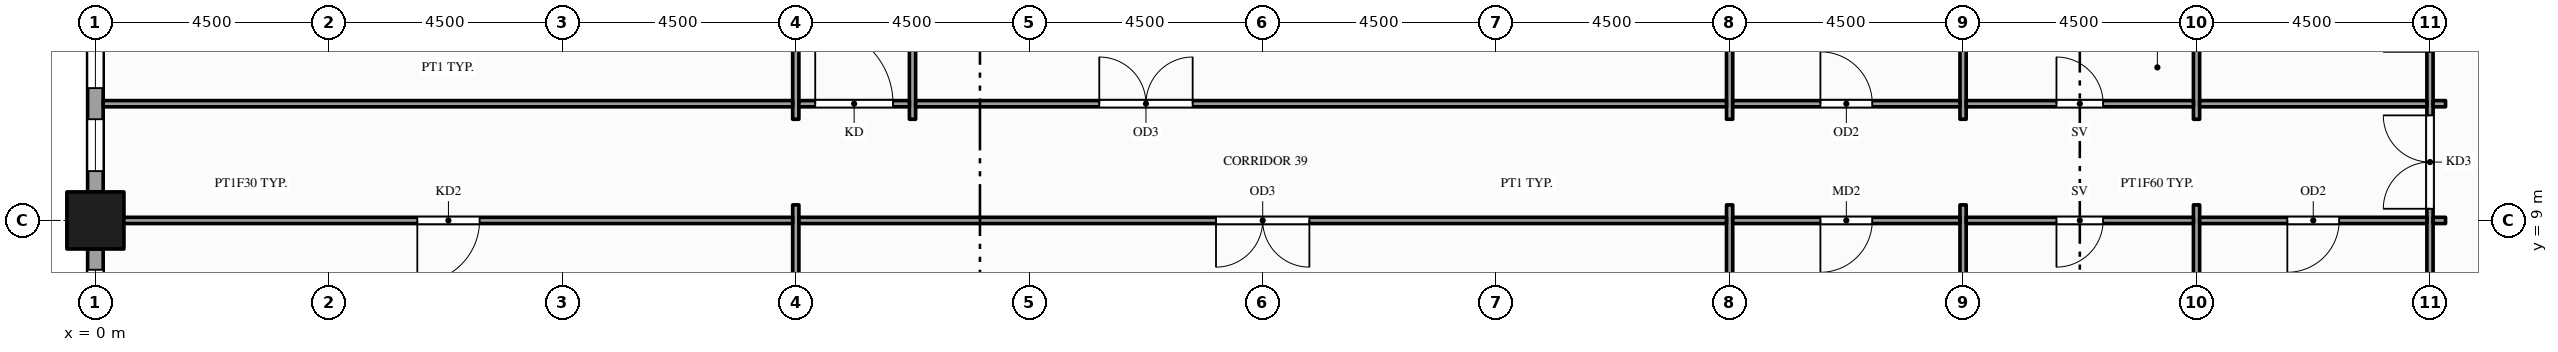
"""IFC4 building model, lengths in metres.
Left out: names, types, materials, properties, quantities, classifications, styles, units other than length and angle.
Written with IfcOpenShell. Run it as: python <this file> out.ifc"""

import sys

from ifc_helpers import new_model, si_unit, direction, frame, frame_2d, origin, origin_2d, place, context, subcontext, project, spatial, rectangle, hollow_rectangle, extrude, element, fill, save


model = new_model("IFC4")
c1 = context("Model", 3, precision=1e-05, world=origin(), true_north=direction((0.0, 1.0)))
c2 = subcontext(c1, "Body", "Model", "MODEL_VIEW")
j1 = project(units=[si_unit("LENGTHUNIT", "METRE"), si_unit("PLANEANGLEUNIT", "RADIAN")], contexts=[c1])
p1 = place(None, origin())
s1 = spatial("IfcSite", under=j1, at=p1, CompositionType="ELEMENT")
p2 = place(p1, origin())
s2 = spatial("IfcBuilding", under=s1, at=p2, CompositionType="ELEMENT")
p3 = place(p2, frame((0.0, 0.0, 61.0)))
s3 = spatial("IfcBuildingStorey", under=s2, at=p3, CompositionType="ELEMENT", Elevation=61.0)
p4 = place(p3, frame((0.0, 9.0, -0.15), z_axis=(0.0, 0.0, 1.0), x_axis=(1.0, 0.0, 0.0)))
e1 = element("IfcColumn", 1, at=p4, inside=s3, PredefinedType="COLUMN", context=c2, shape_type="SweptSolid", body=[
    extrude(hollow_rectangle(XDim=1.1, YDim=1.1, WallThickness=0.06, at=origin_2d()), origin(), (0.0, 0.0, 1.0), 4.0),
])
p5 = place(p3, frame((0.0, 12.95, 0.0), z_axis=(0.0, 0.0, 1.0), x_axis=(0.0, -1.0, 0.0)))
e2 = element("IfcWall", 2, at=p5, inside=s3, PredefinedType="STANDARD", context=c2, shape_type="SweptSolid", body=[
    extrude(rectangle(XDim=3.4, YDim=0.3, at=frame_2d((1.7, 0.0))), origin(), (0.0, 0.0, 1.0), 3.144),
])
p6 = place(p5, frame((0.4, 0.0, 0.9)))
e3 = element("IfcOpeningElement", 3, at=p6, cuts=e2, PredefinedType="OPENING", context=c2, shape_type="SweptSolid", body=[
    extrude(rectangle(XDim=1.0, YDim=2.0, at=frame_2d((0.5, 1.0))), frame((0.0, 0.16, 0.0), z_axis=(0.0, -1.0, 0.0), x_axis=(1.0, 0.0, 0.0)), (0.0, 0.0, 1.0), 0.32),
])
p7 = place(p5, frame((2.0, 0.0, 0.9)))
e4 = element("IfcOpeningElement", 4, at=p7, cuts=e2, PredefinedType="OPENING", context=c2, shape_type="SweptSolid", body=[
    extrude(rectangle(XDim=1.0, YDim=2.0, at=frame_2d((0.5, 1.0))), frame((0.0, 0.16, 0.0), z_axis=(0.0, -1.0, 0.0), x_axis=(1.0, 0.0, 0.0)), (0.0, 0.0, 1.0), 0.32),
])
p8 = place(p3, frame((0.0, 8.45, 0.0), z_axis=(0.0, 0.0, 1.0), x_axis=(0.0, -1.0, 0.0)))
e5 = element("IfcWall", 5, at=p8, inside=s3, PredefinedType="STANDARD", context=c2, shape_type="SweptSolid", body=[
    extrude(rectangle(XDim=3.4, YDim=0.3, at=frame_2d((1.7, 0.0))), origin(), (0.0, 0.0, 1.0), 3.144),
])
p9 = place(p8, frame((0.4, 0.0, 0.9)))
e6 = element("IfcOpeningElement", 6, at=p9, cuts=e5, PredefinedType="OPENING", context=c2, shape_type="SweptSolid", body=[
    extrude(rectangle(XDim=1.0, YDim=2.0, at=frame_2d((0.5, 1.0))), frame((0.0, 0.16, 0.0), z_axis=(0.0, -1.0, 0.0), x_axis=(1.0, 0.0, 0.0)), (0.0, 0.0, 1.0), 0.32),
])
p10 = place(p8, frame((2.0, 0.0, 0.9)))
e7 = element("IfcOpeningElement", 7, at=p10, cuts=e5, PredefinedType="OPENING", context=c2, shape_type="SweptSolid", body=[
    extrude(rectangle(XDim=1.0, YDim=2.0, at=frame_2d((0.5, 1.0))), frame((0.0, 0.16, 0.0), z_axis=(0.0, -1.0, 0.0), x_axis=(1.0, 0.0, 0.0)), (0.0, 0.0, 1.0), 0.32),
])
p11 = place(p3, frame((13.5, 0.15, 0.0), z_axis=(0.0, 0.0, 1.0), x_axis=(0.0, 1.0, 0.0)))
e8 = element("IfcWall", 8, at=p11, inside=s3, PredefinedType="PARTITIONING", context=c2, shape_type="SweptSolid", body=[
    extrude(rectangle(XDim=9.15, YDim=0.12, at=frame_2d((4.575, 0.0))), origin(), (0.0, 0.0, 1.0), 2.938),
])
p12 = place(p3, frame((13.5, 10.95, 0.0), z_axis=(0.0, 0.0, 1.0), x_axis=(0.0, 1.0, 0.0)))
e9 = element("IfcWall", 9, at=p12, inside=s3, PredefinedType="PARTITIONING", context=c2, shape_type="SweptSolid", body=[
    extrude(rectangle(XDim=20.85, YDim=0.12, at=frame_2d((10.425, 0.0))), origin(), (0.0, 0.0, 1.0), 2.6),
])
p13 = place(p12, frame((2.05, 0.0, 0.0)))
e10 = element("IfcOpeningElement", 10, at=p13, cuts=e9, PredefinedType="OPENING", context=c2, shape_type="SweptSolid", body=[
    extrude(rectangle(XDim=1.0, YDim=2.1, at=frame_2d((0.5, 1.05))), frame((0.0, 0.07, 0.0), z_axis=(0.0, -1.0, 0.0), x_axis=(1.0, 0.0, 0.0)), (0.0, 0.0, 1.0), 0.14),
])
p14 = place(p12, frame((6.55, 0.0, 0.0)))
e11 = element("IfcOpeningElement", 11, at=p14, cuts=e9, PredefinedType="OPENING", context=c2, shape_type="SweptSolid", body=[
    extrude(rectangle(XDim=1.0, YDim=2.1, at=frame_2d((0.5, 1.05))), frame((0.0, 0.07, 0.0), z_axis=(0.0, -1.0, 0.0), x_axis=(1.0, 0.0, 0.0)), (0.0, 0.0, 1.0), 0.14),
])
p15 = place(p12, frame((11.805, 0.0, 0.0)))
e12 = element("IfcOpeningElement", 12, at=p15, cuts=e9, PredefinedType="OPENING", context=c2, shape_type="SweptSolid", body=[
    extrude(rectangle(XDim=1.8, YDim=2.1, at=frame_2d((0.9, 1.05))), frame((0.0, 0.07, 0.0), z_axis=(0.0, -1.0, 0.0), x_axis=(1.0, 0.0, 0.0)), (0.0, 0.0, 1.0), 0.14),
])
p16 = place(p3, frame((15.75, 10.95, 0.0), z_axis=(0.0, 0.0, 1.0), x_axis=(0.0, 1.0, 0.0)))
e13 = element("IfcWall", 13, at=p16, inside=s3, PredefinedType="PARTITIONING", context=c2, shape_type="SweptSolid", body=[
    extrude(rectangle(XDim=20.85, YDim=0.12, at=frame_2d((10.425, 0.0))), origin(), (0.0, 0.0, 1.0), 2.6),
])
p17 = place(p16, frame((17.8, 0.0, 0.0)))
e14 = element("IfcOpeningElement", 14, at=p17, cuts=e13, PredefinedType="OPENING", context=c2, shape_type="SweptSolid", body=[
    extrude(rectangle(XDim=1.0, YDim=2.1, at=frame_2d((0.5, 1.05))), frame((0.0, 0.07, 0.0), z_axis=(0.0, -1.0, 0.0), x_axis=(1.0, 0.0, 0.0)), (0.0, 0.0, 1.0), 0.14),
])
p18 = place(p16, frame((4.2, 0.0, 0.0)))
e15 = element("IfcOpeningElement", 15, at=p18, cuts=e13, PredefinedType="OPENING", context=c2, shape_type="SweptSolid", body=[
    extrude(rectangle(XDim=1.2, YDim=2.1, at=frame_2d((0.6, 1.05))), frame((0.0, 0.07, 0.0), z_axis=(0.0, -1.0, 0.0), x_axis=(1.0, 0.0, 0.0)), (0.0, 0.0, 1.0), 0.14),
])
p19 = place(p3, frame((31.5, 1.65, 0.0), z_axis=(0.0, 0.0, 1.0), x_axis=(0.0, 1.0, 0.0)))
e16 = element("IfcWall", 16, at=p19, inside=s3, PredefinedType="PARTITIONING", context=c2, shape_type="SweptSolid", body=[
    extrude(rectangle(XDim=7.65, YDim=0.12, at=frame_2d((3.825, 0.0))), origin(), (0.0, 0.0, 1.0), 2.938),
])
p20 = place(p3, frame((31.5, 10.95, 0.0), z_axis=(0.0, 0.0, 1.0), x_axis=(0.0, 1.0, 0.0)))
e17 = element("IfcWall", 17, at=p20, inside=s3, PredefinedType="PARTITIONING", context=c2, shape_type="SweptSolid", body=[
    extrude(rectangle(XDim=12.9, YDim=0.12, at=frame_2d((6.45, 0.0))), origin(), (0.0, 0.0, 1.0), 2.938),
])
p21 = place(p3, frame((36.0, 1.65, 0.0), z_axis=(0.0, 0.0, 1.0), x_axis=(0.0, 1.0, 0.0)))
e18 = element("IfcWall", 18, at=p21, inside=s3, PredefinedType="PARTITIONING", context=c2, shape_type="SweptSolid", body=[
    extrude(rectangle(XDim=7.65, YDim=0.12, at=frame_2d((3.825, 0.0))), origin(), (0.0, 0.0, 1.0), 2.938),
])
p22 = place(p3, frame((36.0, 10.95, 0.0), z_axis=(0.0, 0.0, 1.0), x_axis=(0.0, 1.0, 0.0)))
e19 = element("IfcWall", 19, at=p22, inside=s3, PredefinedType="PARTITIONING", context=c2, shape_type="SweptSolid", body=[
    extrude(rectangle(XDim=12.9, YDim=0.12, at=frame_2d((6.45, 0.0))), origin(), (0.0, 0.0, 1.0), 2.938),
])
p23 = place(p3, frame((40.5, 1.65, 0.0), z_axis=(0.0, 0.0, 1.0), x_axis=(0.0, 1.0, 0.0)))
e20 = element("IfcWall", 20, at=p23, inside=s3, PredefinedType="PARTITIONING", context=c2, shape_type="SweptSolid", body=[
    extrude(rectangle(XDim=7.65, YDim=0.12, at=frame_2d((3.825, 0.0))), origin(), (0.0, 0.0, 1.0), 2.938),
])
p24 = place(p3, frame((40.5, 10.95, 0.0), z_axis=(0.0, 0.0, 1.0), x_axis=(0.0, 1.0, 0.0)))
e21 = element("IfcWall", 21, at=p24, inside=s3, PredefinedType="PARTITIONING", context=c2, shape_type="SweptSolid", body=[
    extrude(rectangle(XDim=12.9, YDim=0.12, at=frame_2d((6.45, 0.0))), origin(), (0.0, 0.0, 1.0), 2.938),
])
p25 = place(p3, frame((45.0, 1.65, 0.0), z_axis=(0.0, 0.0, 1.0), x_axis=(0.0, 1.0, 0.0)))
e22 = element("IfcWall", 22, at=p25, inside=s3, PredefinedType="PARTITIONING", context=c2, shape_type="SweptSolid", body=[
    extrude(rectangle(XDim=22.2, YDim=0.12, at=frame_2d((11.1, 0.0))), origin(), (0.0, 0.0, 1.0), 2.938),
])
p26 = place(p25, frame((7.575, 0.0, 0.0)))
e23 = element("IfcOpeningElement", 23, at=p26, cuts=e22, PredefinedType="OPENING", context=c2, shape_type="SweptSolid", body=[
    extrude(rectangle(XDim=1.8, YDim=2.1, at=frame_2d((0.9, 1.05))), frame((0.0, 0.07, 0.0), z_axis=(0.0, -1.0, 0.0), x_axis=(1.0, 0.0, 0.0)), (0.0, 0.0, 1.0), 0.14),
])
p27 = place(p25, frame((10.6, 0.0, 0.0)))
e24 = element("IfcOpeningElement", 24, at=p27, cuts=e22, PredefinedType="OPENING", context=c2, shape_type="SweptSolid", body=[
    extrude(rectangle(XDim=0.9, YDim=2.1, at=frame_2d((0.45, 1.05))), frame((0.0, 0.07, 0.0), z_axis=(0.0, -1.0, 0.0), x_axis=(1.0, 0.0, 0.0)), (0.0, 0.0, 1.0), 0.14),
])
p28 = place(p25, frame((15.525, 0.0, 0.0)))
e25 = element("IfcOpeningElement", 25, at=p28, cuts=e22, PredefinedType="OPENING", context=c2, shape_type="SweptSolid", body=[
    extrude(rectangle(XDim=0.9, YDim=2.1, at=frame_2d((0.45, 1.05))), frame((0.0, 0.07, 0.0), z_axis=(0.0, -1.0, 0.0), x_axis=(1.0, 0.0, 0.0)), (0.0, 0.0, 1.0), 0.14),
])
p29 = place(p25, frame((20.35, 0.0, 0.0)))
e26 = element("IfcOpeningElement", 26, at=p29, cuts=e22, PredefinedType="OPENING", context=c2, shape_type="SweptSolid", body=[
    extrude(rectangle(XDim=1.0, YDim=2.1, at=frame_2d((0.5, 1.05))), frame((0.0, 0.07, 0.0), z_axis=(0.0, -1.0, 0.0), x_axis=(1.0, 0.0, 0.0)), (0.0, 0.0, 1.0), 0.14),
])
p30 = place(p3, frame((0.15, 9.0, 0.0), z_axis=(0.0, 0.0, 1.0), x_axis=(1.0, 0.0, 0.0)))
e27 = element("IfcWall", 27, at=p30, inside=s3, PredefinedType="PARTITIONING", context=c2, shape_type="SweptSolid", body=[
    extrude(rectangle(XDim=13.29, YDim=0.12, at=frame_2d((6.645, 0.0))), origin(), (0.0, 0.0, 1.0), 2.938),
])
p31 = place(p30, frame((6.055, 0.0, 0.0)))
e28 = element("IfcOpeningElement", 28, at=p31, cuts=e27, PredefinedType="OPENING", context=c2, shape_type="SweptSolid", body=[
    extrude(rectangle(XDim=1.2, YDim=2.1, at=frame_2d((0.6, 1.05))), frame((0.0, 0.07, 0.0), z_axis=(0.0, -1.0, 0.0), x_axis=(1.0, 0.0, 0.0)), (0.0, 0.0, 1.0), 0.14),
])
p32 = place(p3, frame((13.56, 9.0, 0.0), z_axis=(0.0, 0.0, 1.0), x_axis=(1.0, 0.0, 0.0)))
e29 = element("IfcWall", 29, at=p32, inside=s3, PredefinedType="PARTITIONING", context=c2, shape_type="SweptSolid", body=[
    extrude(rectangle(XDim=17.88, YDim=0.12, at=frame_2d((8.94, 0.0))), origin(), (0.0, 0.0, 1.0), 2.938),
])
p33 = place(p32, frame((8.04, 0.0, 0.0)))
e30 = element("IfcOpeningElement", 30, at=p33, cuts=e29, PredefinedType="OPENING", context=c2, shape_type="SweptSolid", body=[
    extrude(rectangle(XDim=1.8, YDim=2.1, at=frame_2d((0.9, 1.05))), frame((0.0, 0.07, 0.0), z_axis=(0.0, -1.0, 0.0), x_axis=(1.0, 0.0, 0.0)), (0.0, 0.0, 1.0), 0.14),
])
p34 = place(p3, frame((31.56, 9.0, 0.0), z_axis=(0.0, 0.0, 1.0), x_axis=(1.0, 0.0, 0.0)))
e31 = element("IfcWall", 31, at=p34, inside=s3, PredefinedType="PARTITIONING", context=c2, shape_type="SweptSolid", body=[
    extrude(rectangle(XDim=4.38, YDim=0.12, at=frame_2d((2.19, 0.0))), origin(), (0.0, 0.0, 1.0), 2.938),
])
p35 = place(p34, frame((1.69, 0.0, 0.0)))
e32 = element("IfcOpeningElement", 32, at=p35, cuts=e31, PredefinedType="OPENING", context=c2, shape_type="SweptSolid", body=[
    extrude(rectangle(XDim=1.0, YDim=2.1, at=frame_2d((0.5, 1.05))), frame((0.0, 0.07, 0.0), z_axis=(0.0, -1.0, 0.0), x_axis=(1.0, 0.0, 0.0)), (0.0, 0.0, 1.0), 0.14),
])
p36 = place(p3, frame((36.06, 9.0, 0.0), z_axis=(0.0, 0.0, 1.0), x_axis=(1.0, 0.0, 0.0)))
e33 = element("IfcWall", 33, at=p36, inside=s3, PredefinedType="PARTITIONING", context=c2, shape_type="SweptSolid", body=[
    extrude(rectangle(XDim=4.38, YDim=0.12, at=frame_2d((2.19, 0.0))), origin(), (0.0, 0.0, 1.0), 2.938),
])
p37 = place(p36, frame((1.74, 0.0, 0.0)))
e34 = element("IfcOpeningElement", 34, at=p37, cuts=e33, PredefinedType="OPENING", context=c2, shape_type="SweptSolid", body=[
    extrude(rectangle(XDim=0.9, YDim=2.1, at=frame_2d((0.45, 1.05))), frame((0.0, 0.07, 0.0), z_axis=(0.0, -1.0, 0.0), x_axis=(1.0, 0.0, 0.0)), (0.0, 0.0, 1.0), 0.14),
])
p38 = place(p3, frame((40.56, 9.0, 0.0), z_axis=(0.0, 0.0, 1.0), x_axis=(1.0, 0.0, 0.0)))
e35 = element("IfcWall", 35, at=p38, inside=s3, PredefinedType="PARTITIONING", context=c2, shape_type="SweptSolid", body=[
    extrude(rectangle(XDim=4.38, YDim=0.12, at=frame_2d((2.19, 0.0))), origin(), (0.0, 0.0, 1.0), 2.938),
])
p39 = place(p38, frame((1.69, 0.0, 0.0)))
e36 = element("IfcOpeningElement", 36, at=p39, cuts=e35, PredefinedType="OPENING", context=c2, shape_type="SweptSolid", body=[
    extrude(rectangle(XDim=1.0, YDim=2.1, at=frame_2d((0.5, 1.05))), frame((0.0, 0.07, 0.0), z_axis=(0.0, -1.0, 0.0), x_axis=(1.0, 0.0, 0.0)), (0.0, 0.0, 1.0), 0.14),
])
p40 = place(p3, frame((45.06, 9.0, 0.0), z_axis=(0.0, 0.0, 1.0), x_axis=(1.0, 0.0, 0.0)))
e37 = element("IfcWall", 37, at=p40, inside=s3, PredefinedType="PARTITIONING", context=c2, shape_type="SweptSolid", body=[
    extrude(rectangle(XDim=0.24, YDim=0.12, at=frame_2d((0.12, 0.0))), origin(), (0.0, 0.0, 1.0), 2.938),
])
p41 = place(p3, frame((0.15, 11.25, 0.0), z_axis=(0.0, 0.0, 1.0), x_axis=(1.0, 0.0, 0.0)))
e38 = element("IfcWall", 38, at=p41, inside=s3, PredefinedType="PARTITIONING", context=c2, shape_type="SweptSolid", body=[
    extrude(rectangle(XDim=13.29, YDim=0.12, at=frame_2d((6.645, 0.0))), origin(), (0.0, 0.0, 1.0), 2.938),
])
p42 = place(p3, frame((13.56, 11.25, 0.0), z_axis=(0.0, 0.0, 1.0), x_axis=(1.0, 0.0, 0.0)))
e39 = element("IfcWall", 39, at=p42, inside=s3, PredefinedType="PARTITIONING", context=c2, shape_type="SweptSolid", body=[
    extrude(rectangle(XDim=2.13, YDim=0.12, at=frame_2d((1.065, 0.0))), origin(), (0.0, 0.0, 1.0), 2.938),
])
p43 = place(p42, frame((0.315, 0.0, 0.0)))
e40 = element("IfcOpeningElement", 40, at=p43, cuts=e39, PredefinedType="OPENING", context=c2, shape_type="SweptSolid", body=[
    extrude(rectangle(XDim=1.5, YDim=2.1, at=frame_2d((0.75, 1.05))), frame((0.0, 0.07, 0.0), z_axis=(0.0, -1.0, 0.0), x_axis=(1.0, 0.0, 0.0)), (0.0, 0.0, 1.0), 0.14),
])
p44 = place(p3, frame((15.81, 11.25, 0.0), z_axis=(0.0, 0.0, 1.0), x_axis=(1.0, 0.0, 0.0)))
e41 = element("IfcWall", 41, at=p44, inside=s3, PredefinedType="PARTITIONING", context=c2, shape_type="SweptSolid", body=[
    extrude(rectangle(XDim=15.63, YDim=0.12, at=frame_2d((7.815, 0.0))), origin(), (0.0, 0.0, 1.0), 2.938),
])
p45 = place(p44, frame((3.54, 0.0, 0.0)))
e42 = element("IfcOpeningElement", 42, at=p45, cuts=e41, PredefinedType="OPENING", context=c2, shape_type="SweptSolid", body=[
    extrude(rectangle(XDim=1.8, YDim=2.1, at=frame_2d((0.9, 1.05))), frame((0.0, 0.07, 0.0), z_axis=(0.0, -1.0, 0.0), x_axis=(1.0, 0.0, 0.0)), (0.0, 0.0, 1.0), 0.14),
])
p46 = place(p3, frame((31.56, 11.25, 0.0), z_axis=(0.0, 0.0, 1.0), x_axis=(1.0, 0.0, 0.0)))
e43 = element("IfcWall", 43, at=p46, inside=s3, PredefinedType="PARTITIONING", context=c2, shape_type="SweptSolid", body=[
    extrude(rectangle(XDim=4.38, YDim=0.12, at=frame_2d((2.19, 0.0))), origin(), (0.0, 0.0, 1.0), 2.938),
])
p47 = place(p46, frame((1.69, 0.0, 0.0)))
e44 = element("IfcOpeningElement", 44, at=p47, cuts=e43, PredefinedType="OPENING", context=c2, shape_type="SweptSolid", body=[
    extrude(rectangle(XDim=1.0, YDim=2.1, at=frame_2d((0.5, 1.05))), frame((0.0, 0.07, 0.0), z_axis=(0.0, -1.0, 0.0), x_axis=(1.0, 0.0, 0.0)), (0.0, 0.0, 1.0), 0.14),
])
p48 = place(p3, frame((36.06, 11.25, 0.0), z_axis=(0.0, 0.0, 1.0), x_axis=(1.0, 0.0, 0.0)))
e45 = element("IfcWall", 45, at=p48, inside=s3, PredefinedType="PARTITIONING", context=c2, shape_type="SweptSolid", body=[
    extrude(rectangle(XDim=4.38, YDim=0.12, at=frame_2d((2.19, 0.0))), origin(), (0.0, 0.0, 1.0), 2.938),
])
p49 = place(p48, frame((1.74, 0.0, 0.0)))
e46 = element("IfcOpeningElement", 46, at=p49, cuts=e45, PredefinedType="OPENING", context=c2, shape_type="SweptSolid", body=[
    extrude(rectangle(XDim=0.9, YDim=2.1, at=frame_2d((0.45, 1.05))), frame((0.0, 0.07, 0.0), z_axis=(0.0, -1.0, 0.0), x_axis=(1.0, 0.0, 0.0)), (0.0, 0.0, 1.0), 0.14),
])
p50 = place(p3, frame((40.56, 11.25, 0.0), z_axis=(0.0, 0.0, 1.0), x_axis=(1.0, 0.0, 0.0)))
e47 = element("IfcWall", 47, at=p50, inside=s3, PredefinedType="PARTITIONING", context=c2, shape_type="SweptSolid", body=[
    extrude(rectangle(XDim=4.38, YDim=0.12, at=frame_2d((2.19, 0.0))), origin(), (0.0, 0.0, 1.0), 2.938),
])
p51 = place(p3, frame((45.06, 11.25, 0.0), z_axis=(0.0, 0.0, 1.0), x_axis=(1.0, 0.0, 0.0)))
e48 = element("IfcWall", 48, at=p51, inside=s3, PredefinedType="PARTITIONING", context=c2, shape_type="SweptSolid", body=[
    extrude(rectangle(XDim=0.24, YDim=0.12, at=frame_2d((0.12, 0.0))), origin(), (0.0, 0.0, 1.0), 2.938),
])
p52 = place(p6, origin())
e49 = element("IfcWindow", 49, at=p52, inside=s3, PartitioningType="SINGLE_PANEL", PredefinedType="WINDOW", context=c2, shape_type="SweptSolid", body=[
    extrude(rectangle(XDim=1.0, YDim=2.0, at=frame_2d((0.5, 1.0))), frame((0.0, 0.03, 0.0), z_axis=(0.0, -1.0, 0.0), x_axis=(1.0, 0.0, 0.0)), (0.0, 0.0, 1.0), 0.06),
])
fill(e3, e49)
p53 = place(p7, origin())
e50 = element("IfcWindow", 50, at=p53, inside=s3, PartitioningType="SINGLE_PANEL", PredefinedType="WINDOW", context=c2, shape_type="SweptSolid", body=[
    extrude(rectangle(XDim=1.0, YDim=2.0, at=frame_2d((0.5, 1.0))), frame((0.0, 0.03, 0.0), z_axis=(0.0, -1.0, 0.0), x_axis=(1.0, 0.0, 0.0)), (0.0, 0.0, 1.0), 0.06),
])
fill(e4, e50)
p54 = place(p9, origin())
e51 = element("IfcWindow", 51, at=p54, inside=s3, PartitioningType="SINGLE_PANEL", PredefinedType="WINDOW", context=c2, shape_type="SweptSolid", body=[
    extrude(rectangle(XDim=1.0, YDim=2.0, at=frame_2d((0.5, 1.0))), frame((0.0, 0.03, 0.0), z_axis=(0.0, -1.0, 0.0), x_axis=(1.0, 0.0, 0.0)), (0.0, 0.0, 1.0), 0.06),
])
fill(e6, e51)
p55 = place(p26, origin())
e52 = element("IfcDoor", 52, at=p55, inside=s3, OperationType="DOUBLE_DOOR_SINGLE_SWING", PredefinedType="DOOR", context=c2, shape_type="SweptSolid", body=[
    extrude(rectangle(XDim=1.8, YDim=2.1, at=frame_2d((0.9, 1.05))), frame((0.0, 0.025, 0.0), z_axis=(0.0, -1.0, 0.0), x_axis=(1.0, 0.0, 0.0)), (0.0, 0.0, 1.0), 0.05),
])
fill(e23, e52)
p56 = place(p31, origin())
e53 = element("IfcDoor", 53, at=p56, inside=s3, OperationType="SINGLE_SWING_LEFT", PredefinedType="DOOR", context=c2, shape_type="SweptSolid", body=[
    extrude(rectangle(XDim=1.2, YDim=2.1, at=frame_2d((0.6, 1.05))), frame((0.0, 0.025, 0.0), z_axis=(0.0, -1.0, 0.0), x_axis=(1.0, 0.0, 0.0)), (0.0, 0.0, 1.0), 0.05),
])
fill(e28, e53)
p57 = place(p33, origin())
e54 = element("IfcDoor", 54, at=p57, inside=s3, OperationType="DOUBLE_DOOR_SINGLE_SWING", PredefinedType="DOOR", context=c2, shape_type="SweptSolid", body=[
    extrude(rectangle(XDim=1.8, YDim=2.1, at=frame_2d((0.9, 1.05))), frame((0.0, 0.025, 0.0), z_axis=(0.0, -1.0, 0.0), x_axis=(1.0, 0.0, 0.0)), (0.0, 0.0, 1.0), 0.05),
])
fill(e30, e54)
p58 = place(p35, origin())
e55 = element("IfcDoor", 55, at=p58, inside=s3, OperationType="SINGLE_SWING_LEFT", PredefinedType="DOOR", context=c2, shape_type="SweptSolid", body=[
    extrude(rectangle(XDim=1.0, YDim=2.1, at=frame_2d((0.5, 1.05))), frame((0.0, 0.025, 0.0), z_axis=(0.0, -1.0, 0.0), x_axis=(1.0, 0.0, 0.0)), (0.0, 0.0, 1.0), 0.05),
])
fill(e32, e55)
p59 = place(p37, origin())
e56 = element("IfcDoor", 56, at=p59, inside=s3, OperationType="SINGLE_SWING_LEFT", PredefinedType="DOOR", context=c2, shape_type="SweptSolid", body=[
    extrude(rectangle(XDim=0.9, YDim=2.1, at=frame_2d((0.45, 1.05))), frame((0.0, 0.025, 0.0), z_axis=(0.0, -1.0, 0.0), x_axis=(1.0, 0.0, 0.0)), (0.0, 0.0, 1.0), 0.05),
])
fill(e34, e56)
p60 = place(p39, origin())
e57 = element("IfcDoor", 57, at=p60, inside=s3, OperationType="SINGLE_SWING_LEFT", PredefinedType="DOOR", context=c2, shape_type="SweptSolid", body=[
    extrude(rectangle(XDim=1.0, YDim=2.1, at=frame_2d((0.5, 1.05))), frame((0.0, 0.025, 0.0), z_axis=(0.0, -1.0, 0.0), x_axis=(1.0, 0.0, 0.0)), (0.0, 0.0, 1.0), 0.05),
])
fill(e36, e57)
p61 = place(p47, origin())
e58 = element("IfcDoor", 58, at=p61, inside=s3, OperationType="SINGLE_SWING_LEFT", PredefinedType="DOOR", context=c2, shape_type="SweptSolid", body=[
    extrude(rectangle(XDim=1.0, YDim=2.1, at=frame_2d((0.5, 1.05))), frame((0.0, 0.025, 0.0), z_axis=(0.0, -1.0, 0.0), x_axis=(1.0, 0.0, 0.0)), (0.0, 0.0, 1.0), 0.05),
])
fill(e44, e58)
p62 = place(p49, origin())
e59 = element("IfcDoor", 59, at=p62, inside=s3, OperationType="SINGLE_SWING_LEFT", PredefinedType="DOOR", context=c2, shape_type="SweptSolid", body=[
    extrude(rectangle(XDim=0.9, YDim=2.1, at=frame_2d((0.45, 1.05))), frame((0.0, 0.025, 0.0), z_axis=(0.0, -1.0, 0.0), x_axis=(1.0, 0.0, 0.0)), (0.0, 0.0, 1.0), 0.05),
])
fill(e46, e59)
p63 = place(p45, origin())
e60 = element("IfcDoor", 60, at=p63, inside=s3, OperationType="DOUBLE_DOOR_SINGLE_SWING", PredefinedType="DOOR", context=c2, shape_type="SweptSolid", body=[
    extrude(rectangle(XDim=1.8, YDim=2.1, at=frame_2d((0.9, 1.05))), frame((0.0, 0.025, 0.0), z_axis=(0.0, -1.0, 0.0), x_axis=(1.0, 0.0, 0.0)), (0.0, 0.0, 1.0), 0.05),
])
fill(e42, e60)
p64 = place(p43, origin())
e61 = element("IfcDoor", 61, at=p64, inside=s3, OperationType="SINGLE_SWING_LEFT", PredefinedType="DOOR", context=c2, shape_type="SweptSolid", body=[
    extrude(rectangle(XDim=1.5, YDim=2.1, at=frame_2d((0.75, 1.05))), frame((0.0, 0.025, 0.0), z_axis=(0.0, -1.0, 0.0), x_axis=(1.0, 0.0, 0.0)), (0.0, 0.0, 1.0), 0.05),
])
fill(e40, e61)
save(model, sys.argv[1])
